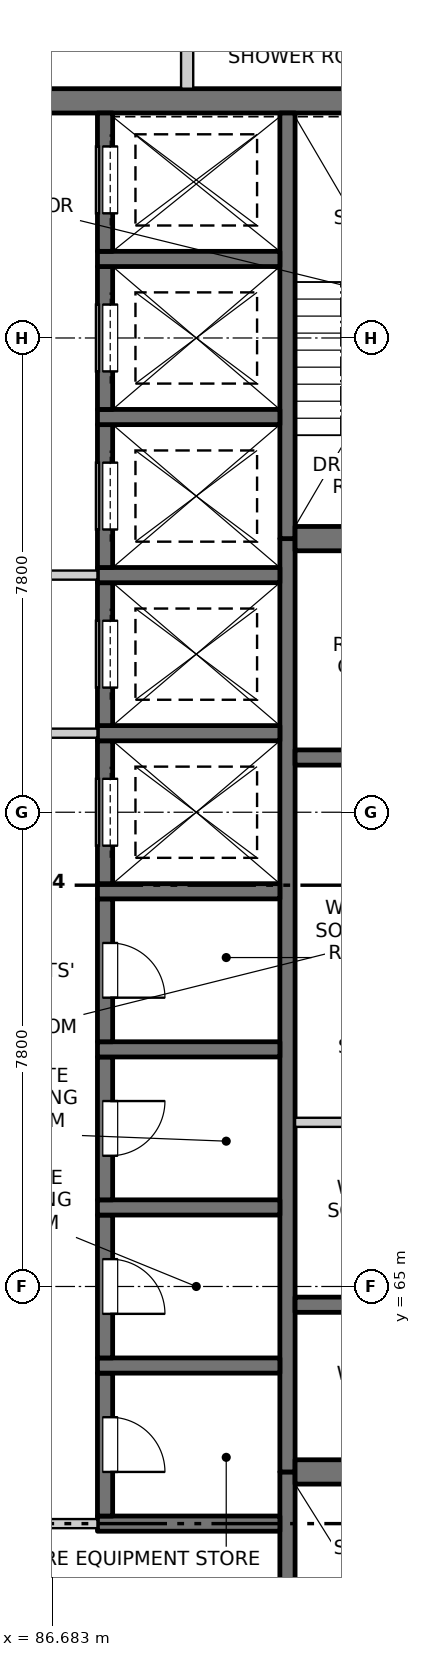
"""IFC4 building model, lengths in metres.
Left out: names, types, materials, properties, quantities, classifications, styles, units other than length and angle.
Written with IfcOpenShell. Run it as: python <this file> out.ifc"""

import sys

from ifc_helpers import new_model, si_unit, direction, frame, frame_2d, origin, place, context, subcontext, project, spatial, rectangle, extrude, element, fill, save


model = new_model("IFC4")
c1 = context("Model", 3, precision=1e-05, world=origin(), true_north=direction((0.0, 1.0)))
c2 = subcontext(c1, "Body", "Model", "MODEL_VIEW")
j1 = project(units=[si_unit("LENGTHUNIT", "METRE"), si_unit("PLANEANGLEUNIT", "RADIAN")], contexts=[c1])
p1 = place(None, origin())
s1 = spatial("IfcSite", under=j1, at=p1, CompositionType="ELEMENT")
p2 = place(p1, origin())
s2 = spatial("IfcBuilding", under=s1, at=p2, CompositionType="ELEMENT")
p3 = place(p2, frame((0.0, 0.0, 214.3)))
s3 = spatial("IfcBuildingStorey", under=s2, at=p3, CompositionType="ELEMENT", Elevation=214.3)
p4 = place(p3, frame((75.45, 84.5, -0.25), z_axis=(0.0, 0.0, 1.0), x_axis=(1.0, 0.0, 0.0)))
e1 = element("IfcWall", 1, at=p4, inside=s3, PredefinedType="SOLIDWALL", context=c2, shape_type="SweptSolid", body=[
    extrude(rectangle(XDim=19.1, YDim=0.4, at=frame_2d((9.55, 0.0))), origin(), (0.0, 0.0, 1.0), 3.4),
])
p5 = place(p3, frame((90.55, 55.45, -0.25), z_axis=(0.0, 0.0, 1.0), x_axis=(0.0, 1.0, 0.0)))
e2 = element("IfcWall", 2, at=p5, inside=s3, PredefinedType="SOLIDWALL", context=c2, shape_type="SweptSolid", body=[
    extrude(rectangle(XDim=6.5, YDim=0.25, at=frame_2d((3.25, 0.0))), origin(), (0.0, 0.0, 1.0), 3.4),
])
p6 = place(p5, frame((0.2, 0.0, 0.25)))
e3 = element("IfcOpeningElement", 3, at=p6, cuts=e2, PredefinedType="OPENING", context=c2, shape_type="SweptSolid", body=[
    extrude(rectangle(XDim=1.2, YDim=2.1, at=frame_2d((0.6, 1.05))), frame((0.0, 0.135, 0.0), z_axis=(0.0, -1.0, 0.0), x_axis=(1.0, 0.0, 0.0)), (0.0, 0.0, 1.0), 0.27),
])
p7 = place(p3, frame((90.55, 61.95, -0.25), z_axis=(0.0, 0.0, 1.0), x_axis=(0.0, 1.0, 0.0)))
e4 = element("IfcWall", 4, at=p7, inside=s3, PredefinedType="SOLIDWALL", context=c2, shape_type="SweptSolid", body=[
    extrude(rectangle(XDim=15.35, YDim=0.25, at=frame_2d((7.675, 0.0))), origin(), (0.0, 0.0, 1.0), 3.4),
])
p8 = place(p3, frame((90.55, 77.3, -0.25), z_axis=(0.0, 0.0, 1.0), x_axis=(0.0, 1.0, 0.0)))
e5 = element("IfcWall", 5, at=p8, inside=s3, PredefinedType="SOLIDWALL", context=c2, shape_type="SweptSolid", body=[
    extrude(rectangle(XDim=7.0, YDim=0.25, at=frame_2d((3.5, 0.0))), origin(), (0.0, 0.0, 1.0), 3.4),
])
p9 = place(p3, frame((87.425, 61.1, -0.25), z_axis=(0.0, 0.0, 1.0), x_axis=(1.0, 0.0, 0.0)))
e6 = element("IfcWall", 6, at=p9, inside=s3, PredefinedType="SOLIDWALL", context=c2, shape_type="SweptSolid", body=[
    extrude(rectangle(XDim=3.0, YDim=0.25, at=frame_2d((1.5, 0.0))), origin(), (0.0, 0.0, 1.0), 3.4),
])
p10 = place(p3, frame((87.55, 61.225, -0.25), z_axis=(0.0, 0.0, 1.0), x_axis=(0.0, 1.0, 0.0)))
e7 = element("IfcWall", 7, at=p10, inside=s3, PredefinedType="SOLIDWALL", context=c2, shape_type="SweptSolid", body=[
    extrude(rectangle(XDim=2.35, YDim=0.25, at=frame_2d((1.175, 0.0))), origin(), (0.0, 0.0, 1.0), 3.4),
])
p11 = place(p10, frame((0.725, 0.0, 0.25)))
e8 = element("IfcOpeningElement", 8, at=p11, cuts=e7, PredefinedType="OPENING", context=c2, shape_type="SweptSolid", body=[
    extrude(rectangle(XDim=0.9, YDim=2.1, at=frame_2d((0.45, 1.05))), frame((0.0, 0.135, 0.0), z_axis=(0.0, -1.0, 0.0), x_axis=(1.0, 0.0, 0.0)), (0.0, 0.0, 1.0), 0.27),
])
p12 = place(p3, frame((87.425, 63.7, -0.25), z_axis=(0.0, 0.0, 1.0), x_axis=(1.0, 0.0, 0.0)))
e9 = element("IfcWall", 9, at=p12, inside=s3, PredefinedType="SOLIDWALL", context=c2, shape_type="SweptSolid", body=[
    extrude(rectangle(XDim=3.0, YDim=0.25, at=frame_2d((1.5, 0.0))), origin(), (0.0, 0.0, 1.0), 3.4),
])
p13 = place(p3, frame((87.55, 63.825, -0.25), z_axis=(0.0, 0.0, 1.0), x_axis=(0.0, 1.0, 0.0)))
e10 = element("IfcWall", 10, at=p13, inside=s3, PredefinedType="SOLIDWALL", context=c2, shape_type="SweptSolid", body=[
    extrude(rectangle(XDim=2.35, YDim=0.25, at=frame_2d((1.175, 0.0))), origin(), (0.0, 0.0, 1.0), 3.4),
])
p14 = place(p13, frame((0.725, 0.0, 0.25)))
e11 = element("IfcOpeningElement", 11, at=p14, cuts=e10, PredefinedType="OPENING", context=c2, shape_type="SweptSolid", body=[
    extrude(rectangle(XDim=0.9, YDim=2.1, at=frame_2d((0.45, 1.05))), frame((0.0, 0.135, 0.0), z_axis=(0.0, -1.0, 0.0), x_axis=(1.0, 0.0, 0.0)), (0.0, 0.0, 1.0), 0.27),
])
p15 = place(p3, frame((87.425, 66.3, -0.25), z_axis=(0.0, 0.0, 1.0), x_axis=(1.0, 0.0, 0.0)))
e12 = element("IfcWall", 12, at=p15, inside=s3, PredefinedType="SOLIDWALL", context=c2, shape_type="SweptSolid", body=[
    extrude(rectangle(XDim=3.0, YDim=0.25, at=frame_2d((1.5, 0.0))), origin(), (0.0, 0.0, 1.0), 3.4),
])
p16 = place(p3, frame((87.55, 66.425, -0.25), z_axis=(0.0, 0.0, 1.0), x_axis=(0.0, 1.0, 0.0)))
e13 = element("IfcWall", 13, at=p16, inside=s3, PredefinedType="SOLIDWALL", context=c2, shape_type="SweptSolid", body=[
    extrude(rectangle(XDim=2.35, YDim=0.25, at=frame_2d((1.175, 0.0))), origin(), (0.0, 0.0, 1.0), 3.4),
])
p17 = place(p16, frame((0.725, 0.0, 0.25)))
e14 = element("IfcOpeningElement", 14, at=p17, cuts=e13, PredefinedType="OPENING", context=c2, shape_type="SweptSolid", body=[
    extrude(rectangle(XDim=0.9, YDim=2.1, at=frame_2d((0.45, 1.05))), frame((0.0, 0.135, 0.0), z_axis=(0.0, -1.0, 0.0), x_axis=(1.0, 0.0, 0.0)), (0.0, 0.0, 1.0), 0.27),
])
p18 = place(p3, frame((87.425, 68.9, -0.25), z_axis=(0.0, 0.0, 1.0), x_axis=(1.0, 0.0, 0.0)))
e15 = element("IfcWall", 15, at=p18, inside=s3, PredefinedType="SOLIDWALL", context=c2, shape_type="SweptSolid", body=[
    extrude(rectangle(XDim=3.0, YDim=0.25, at=frame_2d((1.5, 0.0))), origin(), (0.0, 0.0, 1.0), 3.4),
])
p19 = place(p3, frame((87.55, 69.025, -0.25), z_axis=(0.0, 0.0, 1.0), x_axis=(0.0, 1.0, 0.0)))
e16 = element("IfcWall", 16, at=p19, inside=s3, PredefinedType="SOLIDWALL", context=c2, shape_type="SweptSolid", body=[
    extrude(rectangle(XDim=2.35, YDim=0.25, at=frame_2d((1.175, 0.0))), origin(), (0.0, 0.0, 1.0), 3.4),
])
p20 = place(p19, frame((0.725, 0.0, 0.25)))
e17 = element("IfcOpeningElement", 17, at=p20, cuts=e16, PredefinedType="OPENING", context=c2, shape_type="SweptSolid", body=[
    extrude(rectangle(XDim=0.9, YDim=2.1, at=frame_2d((0.45, 1.05))), frame((0.0, 0.135, 0.0), z_axis=(0.0, -1.0, 0.0), x_axis=(1.0, 0.0, 0.0)), (0.0, 0.0, 1.0), 0.27),
])
p21 = place(p3, frame((87.425, 71.5, -0.25), z_axis=(0.0, 0.0, 1.0), x_axis=(1.0, 0.0, 0.0)))
e18 = element("IfcWall", 18, at=p21, inside=s3, PredefinedType="SOLIDWALL", context=c2, shape_type="SweptSolid", body=[
    extrude(rectangle(XDim=3.0, YDim=0.25, at=frame_2d((1.5, 0.0))), origin(), (0.0, 0.0, 1.0), 3.4),
])
p22 = place(p3, frame((87.55, 71.625, -0.25), z_axis=(0.0, 0.0, 1.0), x_axis=(0.0, 1.0, 0.0)))
e19 = element("IfcWall", 19, at=p22, inside=s3, PredefinedType="SOLIDWALL", context=c2, shape_type="SweptSolid", body=[
    extrude(rectangle(XDim=2.35, YDim=0.25, at=frame_2d((1.175, 0.0))), origin(), (0.0, 0.0, 1.0), 3.4),
])
p23 = place(p22, frame((0.625, 0.0, 0.25)))
e20 = element("IfcOpeningElement", 20, at=p23, cuts=e19, PredefinedType="OPENING", context=c2, shape_type="SweptSolid", body=[
    extrude(rectangle(XDim=1.1, YDim=2.1, at=frame_2d((0.55, 1.05))), frame((0.0, 0.135, 0.0), z_axis=(0.0, -1.0, 0.0), x_axis=(1.0, 0.0, 0.0)), (0.0, 0.0, 1.0), 0.27),
])
p24 = place(p3, frame((87.425, 74.1, -0.25), z_axis=(0.0, 0.0, 1.0), x_axis=(1.0, 0.0, 0.0)))
e21 = element("IfcWall", 21, at=p24, inside=s3, PredefinedType="SOLIDWALL", context=c2, shape_type="SweptSolid", body=[
    extrude(rectangle(XDim=3.0, YDim=0.25, at=frame_2d((1.5, 0.0))), origin(), (0.0, 0.0, 1.0), 3.4),
])
p25 = place(p3, frame((87.55, 74.225, -0.25), z_axis=(0.0, 0.0, 1.0), x_axis=(0.0, 1.0, 0.0)))
e22 = element("IfcWall", 22, at=p25, inside=s3, PredefinedType="SOLIDWALL", context=c2, shape_type="SweptSolid", body=[
    extrude(rectangle(XDim=2.35, YDim=0.25, at=frame_2d((1.175, 0.0))), origin(), (0.0, 0.0, 1.0), 3.4),
])
p26 = place(p25, frame((0.625, 0.0, 0.25)))
e23 = element("IfcOpeningElement", 23, at=p26, cuts=e22, PredefinedType="OPENING", context=c2, shape_type="SweptSolid", body=[
    extrude(rectangle(XDim=1.1, YDim=2.1, at=frame_2d((0.55, 1.05))), frame((0.0, 0.135, 0.0), z_axis=(0.0, -1.0, 0.0), x_axis=(1.0, 0.0, 0.0)), (0.0, 0.0, 1.0), 0.27),
])
p27 = place(p3, frame((87.425, 76.7, -0.25), z_axis=(0.0, 0.0, 1.0), x_axis=(1.0, 0.0, 0.0)))
e24 = element("IfcWall", 24, at=p27, inside=s3, PredefinedType="SOLIDWALL", context=c2, shape_type="SweptSolid", body=[
    extrude(rectangle(XDim=3.0, YDim=0.25, at=frame_2d((1.5, 0.0))), origin(), (0.0, 0.0, 1.0), 3.4),
])
p28 = place(p3, frame((87.55, 76.825, -0.25), z_axis=(0.0, 0.0, 1.0), x_axis=(0.0, 1.0, 0.0)))
e25 = element("IfcWall", 25, at=p28, inside=s3, PredefinedType="SOLIDWALL", context=c2, shape_type="SweptSolid", body=[
    extrude(rectangle(XDim=2.35, YDim=0.25, at=frame_2d((1.175, 0.0))), origin(), (0.0, 0.0, 1.0), 3.4),
])
p29 = place(p28, frame((0.625, 0.0, 0.25)))
e26 = element("IfcOpeningElement", 26, at=p29, cuts=e25, PredefinedType="OPENING", context=c2, shape_type="SweptSolid", body=[
    extrude(rectangle(XDim=1.1, YDim=2.1, at=frame_2d((0.55, 1.05))), frame((0.0, 0.135, 0.0), z_axis=(0.0, -1.0, 0.0), x_axis=(1.0, 0.0, 0.0)), (0.0, 0.0, 1.0), 0.27),
])
p30 = place(p3, frame((87.425, 79.3, -0.25), z_axis=(0.0, 0.0, 1.0), x_axis=(1.0, 0.0, 0.0)))
e27 = element("IfcWall", 27, at=p30, inside=s3, PredefinedType="SOLIDWALL", context=c2, shape_type="SweptSolid", body=[
    extrude(rectangle(XDim=3.0, YDim=0.25, at=frame_2d((1.5, 0.0))), origin(), (0.0, 0.0, 1.0), 3.4),
])
p31 = place(p3, frame((87.55, 79.425, -0.25), z_axis=(0.0, 0.0, 1.0), x_axis=(0.0, 1.0, 0.0)))
e28 = element("IfcWall", 28, at=p31, inside=s3, PredefinedType="SOLIDWALL", context=c2, shape_type="SweptSolid", body=[
    extrude(rectangle(XDim=2.35, YDim=0.25, at=frame_2d((1.175, 0.0))), origin(), (0.0, 0.0, 1.0), 3.4),
])
p32 = place(p31, frame((0.625, 0.0, 0.25)))
e29 = element("IfcOpeningElement", 29, at=p32, cuts=e28, PredefinedType="OPENING", context=c2, shape_type="SweptSolid", body=[
    extrude(rectangle(XDim=1.1, YDim=2.1, at=frame_2d((0.55, 1.05))), frame((0.0, 0.135, 0.0), z_axis=(0.0, -1.0, 0.0), x_axis=(1.0, 0.0, 0.0)), (0.0, 0.0, 1.0), 0.27),
])
p33 = place(p3, frame((87.425, 81.9, -0.25), z_axis=(0.0, 0.0, 1.0), x_axis=(1.0, 0.0, 0.0)))
e30 = element("IfcWall", 30, at=p33, inside=s3, PredefinedType="SOLIDWALL", context=c2, shape_type="SweptSolid", body=[
    extrude(rectangle(XDim=3.0, YDim=0.25, at=frame_2d((1.5, 0.0))), origin(), (0.0, 0.0, 1.0), 3.4),
])
p34 = place(p3, frame((87.55, 82.025, -0.25), z_axis=(0.0, 0.0, 1.0), x_axis=(0.0, 1.0, 0.0)))
e31 = element("IfcWall", 31, at=p34, inside=s3, PredefinedType="SOLIDWALL", context=c2, shape_type="SweptSolid", body=[
    extrude(rectangle(XDim=2.275, YDim=0.25, at=frame_2d((1.138, 0.0))), origin(), (0.0, 0.0, 1.0), 3.4),
])
p35 = place(p34, frame((0.625, 0.0, 0.25)))
e32 = element("IfcOpeningElement", 32, at=p35, cuts=e31, PredefinedType="OPENING", context=c2, shape_type="SweptSolid", body=[
    extrude(rectangle(XDim=1.1, YDim=2.1, at=frame_2d((0.55, 1.05))), frame((0.0, 0.135, 0.0), z_axis=(0.0, -1.0, 0.0), x_axis=(1.0, 0.0, 0.0)), (0.0, 0.0, 1.0), 0.27),
])
p36 = place(p3, frame((90.675, 61.95, -0.25), z_axis=(0.0, 0.0, 1.0), x_axis=(1.0, 0.0, 0.0)))
e33 = element("IfcWall", 33, at=p36, inside=s3, PredefinedType="SOLIDWALL", context=c2, shape_type="SweptSolid", body=[
    extrude(rectangle(XDim=3.875, YDim=0.4, at=frame_2d((1.938, 0.0))), origin(), (0.0, 0.0, 1.0), 3.4),
])
for number, where, z_axis, x_axis in (
    (34, (90.675, 64.7, -0.25), (0.0, 0.0, 1.0), (1.0, 0.0, 0.0)),
    (35, (90.675, 73.7, -0.25), (0.0, 0.0, 1.0), (1.0, 0.0, 0.0)),
):
    element("IfcWall", number, at=place(p3, frame(where, z_axis=z_axis, x_axis=x_axis)), inside=s3, PredefinedType="SOLIDWALL", context=c2, shape_type="SweptSolid", body=[
        extrude(rectangle(XDim=3.875, YDim=0.25, at=frame_2d((1.938, 0.0))), origin(), (0.0, 0.0, 1.0), 3.4),
    ])
p37 = place(p3, frame((90.675, 77.3, -0.25), z_axis=(0.0, 0.0, 1.0), x_axis=(1.0, 0.0, 0.0)))
e36 = element("IfcWall", 36, at=p37, inside=s3, PredefinedType="SOLIDWALL", context=c2, shape_type="SweptSolid", body=[
    extrude(rectangle(XDim=3.875, YDim=0.4, at=frame_2d((1.938, 0.0))), origin(), (0.0, 0.0, 1.0), 3.4),
])
p38 = place(p3, frame((82.575, 61.1, 0.0), z_axis=(0.0, 0.0, 1.0), x_axis=(1.0, 0.0, 0.0)))
e37 = element("IfcWall", 37, at=p38, inside=s3, PredefinedType="PARTITIONING", context=c2, shape_type="SweptSolid", body=[
    extrude(rectangle(XDim=4.85, YDim=0.15, at=frame_2d((2.425, 0.0))), origin(), (0.0, 0.0, 1.0), 3.15),
])
p39 = place(p38, frame((1.525, 0.0, 0.0)))
e38 = element("IfcOpeningElement", 38, at=p39, cuts=e37, PredefinedType="OPENING", context=c2, shape_type="SweptSolid", body=[
    extrude(rectangle(XDim=1.8, YDim=2.1, at=frame_2d((0.9, 1.05))), frame((0.0, 0.085, 0.0), z_axis=(0.0, -1.0, 0.0), x_axis=(1.0, 0.0, 0.0)), (0.0, 0.0, 1.0), 0.17),
])
p40 = place(p3, frame((90.675, 67.7, 0.0), z_axis=(0.0, 0.0, 1.0), x_axis=(1.0, 0.0, 0.0)))
e39 = element("IfcWall", 39, at=p40, inside=s3, PredefinedType="PARTITIONING", context=c2, shape_type="SweptSolid", body=[
    extrude(rectangle(XDim=3.875, YDim=0.15, at=frame_2d((1.938, 0.0))), origin(), (0.0, 0.0, 1.0), 3.15),
])
p41 = place(p3, frame((82.575, 74.1, 0.0), z_axis=(0.0, 0.0, 1.0), x_axis=(1.0, 0.0, 0.0)))
e40 = element("IfcWall", 40, at=p41, inside=s3, PredefinedType="PARTITIONING", context=c2, shape_type="SweptSolid", body=[
    extrude(rectangle(XDim=4.85, YDim=0.15, at=frame_2d((2.425, 0.0))), origin(), (0.0, 0.0, 1.0), 3.15),
])
p42 = place(p41, frame((1.525, 0.0, 0.0)))
e41 = element("IfcOpeningElement", 41, at=p42, cuts=e40, PredefinedType="OPENING", context=c2, shape_type="SweptSolid", body=[
    extrude(rectangle(XDim=1.8, YDim=2.1, at=frame_2d((0.9, 1.05))), frame((0.0, 0.085, 0.0), z_axis=(0.0, -1.0, 0.0), x_axis=(1.0, 0.0, 0.0)), (0.0, 0.0, 1.0), 0.17),
])
p43 = place(p3, frame((82.575, 76.7, 0.0), z_axis=(0.0, 0.0, 1.0), x_axis=(1.0, 0.0, 0.0)))
e42 = element("IfcWall", 42, at=p43, inside=s3, PredefinedType="PARTITIONING", context=c2, shape_type="SweptSolid", body=[
    extrude(rectangle(XDim=4.85, YDim=0.15, at=frame_2d((2.425, 0.0))), origin(), (0.0, 0.0, 1.0), 3.15),
])
p44 = place(p43, frame((1.525, 0.0, 0.0)))
e43 = element("IfcOpeningElement", 43, at=p44, cuts=e42, PredefinedType="OPENING", context=c2, shape_type="SweptSolid", body=[
    extrude(rectangle(XDim=1.8, YDim=2.1, at=frame_2d((0.9, 1.05))), frame((0.0, 0.085, 0.0), z_axis=(0.0, -1.0, 0.0), x_axis=(1.0, 0.0, 0.0)), (0.0, 0.0, 1.0), 0.17),
])
p45 = place(p3, frame((88.9, 84.7, 0.0), z_axis=(0.0, 0.0, 1.0), x_axis=(0.0, 1.0, 0.0)))
e44 = element("IfcWall", 44, at=p45, inside=s3, PredefinedType="PARTITIONING", context=c2, shape_type="SweptSolid", body=[
    extrude(rectangle(XDim=3.4, YDim=0.2, at=frame_2d((1.7, 0.0))), origin(), (0.0, 0.0, 1.0), 3.15),
])
p46 = place(p11, origin())
e45 = element("IfcDoor", 45, at=p46, inside=s3, OperationType="SINGLE_SWING_RIGHT", PredefinedType="DOOR", context=c2, shape_type="SweptSolid", body=[
    extrude(rectangle(XDim=0.9, YDim=2.1, at=frame_2d((0.45, 1.05))), frame((0.0, -0.06, 0.0), z_axis=(0.0, -1.0, 0.0), x_axis=(1.0, 0.0, 0.0)), (0.0, 0.0, 1.0), 0.05),
])
fill(e8, e45)
p47 = place(p14, origin())
e46 = element("IfcDoor", 46, at=p47, inside=s3, OperationType="SINGLE_SWING_RIGHT", PredefinedType="DOOR", context=c2, shape_type="SweptSolid", body=[
    extrude(rectangle(XDim=0.9, YDim=2.1, at=frame_2d((0.45, 1.05))), frame((0.0, -0.06, 0.0), z_axis=(0.0, -1.0, 0.0), x_axis=(1.0, 0.0, 0.0)), (0.0, 0.0, 1.0), 0.05),
])
fill(e11, e46)
p48 = place(p17, origin())
e47 = element("IfcDoor", 47, at=p48, inside=s3, OperationType="SINGLE_SWING_LEFT", PredefinedType="DOOR", context=c2, shape_type="SweptSolid", body=[
    extrude(rectangle(XDim=0.9, YDim=2.1, at=frame_2d((0.45, 1.05))), frame((0.0, -0.06, 0.0), z_axis=(0.0, -1.0, 0.0), x_axis=(1.0, 0.0, 0.0)), (0.0, 0.0, 1.0), 0.05),
])
fill(e14, e47)
p49 = place(p20, origin())
e48 = element("IfcDoor", 48, at=p49, inside=s3, OperationType="SINGLE_SWING_RIGHT", PredefinedType="DOOR", context=c2, shape_type="SweptSolid", body=[
    extrude(rectangle(XDim=0.9, YDim=2.1, at=frame_2d((0.45, 1.05))), frame((0.0, -0.06, 0.0), z_axis=(0.0, -1.0, 0.0), x_axis=(1.0, 0.0, 0.0)), (0.0, 0.0, 1.0), 0.05),
])
fill(e17, e48)
p50 = place(p23, origin())
e49 = element("IfcDoor", 49, at=p50, inside=s3, OperationType="SLIDING_TO_LEFT", PredefinedType="DOOR", context=c2, shape_type="SweptSolid", body=[
    extrude(rectangle(XDim=1.1, YDim=2.1, at=frame_2d((0.55, 1.05))), frame((0.0, -0.06, 0.0), z_axis=(0.0, -1.0, 0.0), x_axis=(1.0, 0.0, 0.0)), (0.0, 0.0, 1.0), 0.05),
])
fill(e20, e49)
p51 = place(p26, origin())
e50 = element("IfcDoor", 50, at=p51, inside=s3, OperationType="SLIDING_TO_LEFT", PredefinedType="DOOR", context=c2, shape_type="SweptSolid", body=[
    extrude(rectangle(XDim=1.1, YDim=2.1, at=frame_2d((0.55, 1.05))), frame((0.0, -0.06, 0.0), z_axis=(0.0, -1.0, 0.0), x_axis=(1.0, 0.0, 0.0)), (0.0, 0.0, 1.0), 0.05),
])
fill(e23, e50)
p52 = place(p29, origin())
e51 = element("IfcDoor", 51, at=p52, inside=s3, OperationType="SLIDING_TO_LEFT", PredefinedType="DOOR", context=c2, shape_type="SweptSolid", body=[
    extrude(rectangle(XDim=1.1, YDim=2.1, at=frame_2d((0.55, 1.05))), frame((0.0, -0.06, 0.0), z_axis=(0.0, -1.0, 0.0), x_axis=(1.0, 0.0, 0.0)), (0.0, 0.0, 1.0), 0.05),
])
fill(e26, e51)
p53 = place(p32, origin())
e52 = element("IfcDoor", 52, at=p53, inside=s3, OperationType="SLIDING_TO_RIGHT", PredefinedType="DOOR", context=c2, shape_type="SweptSolid", body=[
    extrude(rectangle(XDim=1.1, YDim=2.1, at=frame_2d((0.55, 1.05))), frame((0.0, -0.06, 0.0), z_axis=(0.0, -1.0, 0.0), x_axis=(1.0, 0.0, 0.0)), (0.0, 0.0, 1.0), 0.05),
])
fill(e29, e52)
p54 = place(p35, origin())
e53 = element("IfcDoor", 53, at=p54, inside=s3, OperationType="SLIDING_TO_RIGHT", PredefinedType="DOOR", context=c2, shape_type="SweptSolid", body=[
    extrude(rectangle(XDim=1.1, YDim=2.1, at=frame_2d((0.55, 1.05))), frame((0.0, -0.06, 0.0), z_axis=(0.0, -1.0, 0.0), x_axis=(1.0, 0.0, 0.0)), (0.0, 0.0, 1.0), 0.05),
])
fill(e32, e53)
save(model, sys.argv[1])
